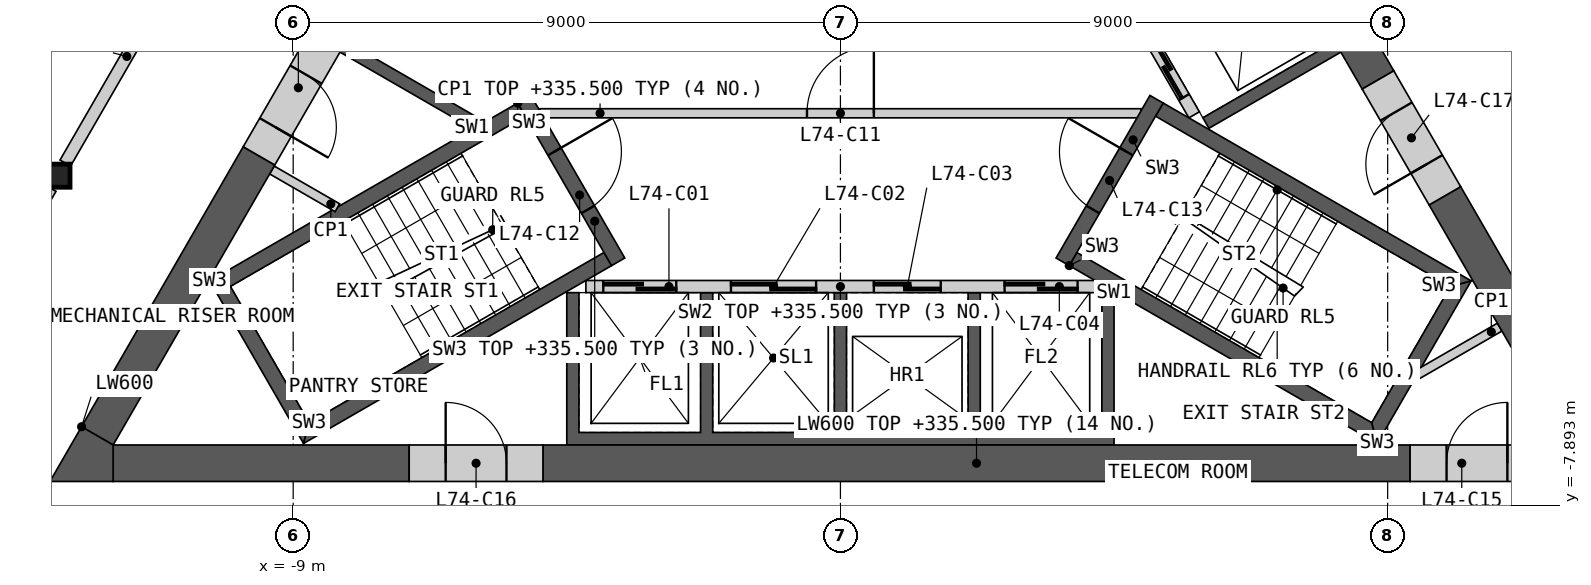
"""IFC4 building model, lengths in metres.
Left out: names, types, materials, properties, quantities, classifications, styles, units other than length and angle.
Written with IfcOpenShell. Run it as: python <this file> out.ifc"""

import sys

from ifc_helpers import new_model, si_unit, direction, frame, frame_2d, origin, origin_2d, place, context, subcontext, project, spatial, polyline, rectangle, i_section, outline, extrude, element, fill, save


model = new_model("IFC4")
c1 = context("Model", 3, precision=1e-05, world=origin(), true_north=direction((0.0, 1.0)))
c2 = subcontext(c1, "Body", "Model", "MODEL_VIEW")
j1 = project(units=[si_unit("LENGTHUNIT", "METRE"), si_unit("PLANEANGLEUNIT", "RADIAN")], contexts=[c1])
p1 = place(None, origin())
s1 = spatial("IfcSite", under=j1, at=p1, CompositionType="ELEMENT")
p2 = place(p1, origin())
s2 = spatial("IfcBuilding", under=s1, at=p2, CompositionType="ELEMENT")
p3 = place(p2, frame((0.0, 0.0, 332.4)))
s3 = spatial("IfcBuildingStorey", under=s2, at=p3, CompositionType="ELEMENT", Elevation=332.4)
p4 = place(p3, frame((-12.868, -2.476, 0.0), z_axis=(0.0, 0.0, 1.0), x_axis=(1.0, 0.0, 0.0)))
e1 = element("IfcColumn", 1, at=p4, inside=s3, PredefinedType="COLUMN", context=c2, shape_type="SweptSolid", body=[
    extrude(i_section(OverallWidth=0.396, OverallDepth=0.381, WebThickness=0.019, FlangeThickness=0.03, at=origin_2d()), origin(), (0.0, 0.0, 1.0), 3.4),
])
p5 = place(p3, origin())
e2 = element("IfcWall", 2, at=p5, inside=s3, PredefinedType="SHEAR", context=c2, shape_type="SweptSolid", body=[
    extrude(outline(polyline([(4.5, -4.4), (4.5, -6.906), (-4.5, -6.906), (-4.5, -4.4), (-4.3, -4.4), (-4.3, -6.7), (-2.3, -6.7), (-2.3, -4.4), (-2.1, -4.4), (-2.1, -6.7), (-0.1, -6.7), (-0.1, -4.4), (0.1, -4.4), (0.1, -6.7), (2.1, -6.7), (2.1, -4.4), (2.3, -4.4), (2.3, -6.7), (4.3, -6.7), (4.3, -4.4), (4.5, -4.4)])), origin(), (0.0, 0.0, 1.0), 3.1),
])
p6 = place(p3, frame((-4.187, -4.3, 0.0), z_axis=(0.0, 0.0, 1.0), x_axis=(1.0, 0.0, 0.0)))
e3 = element("IfcWall", 3, at=p6, inside=s3, PredefinedType="SOLIDWALL", context=c2, shape_type="SweptSolid", body=[
    extrude(rectangle(XDim=8.373, YDim=0.2, at=frame_2d((4.187, 0.0))), origin(), (0.0, 0.0, 1.0), 3.1),
])
p7 = place(p6, frame((0.287, 0.0, 0.0)))
e4 = element("IfcOpeningElement", 4, at=p7, cuts=e3, PredefinedType="OPENING", context=c2, shape_type="SweptSolid", body=[
    extrude(rectangle(XDim=1.2, YDim=2.1, at=frame_2d((0.6, 1.05))), frame((0.0, 0.11, 0.0), z_axis=(0.0, -1.0, 0.0), x_axis=(1.0, 0.0, 0.0)), (0.0, 0.0, 1.0), 0.22),
])
p8 = place(p6, frame((2.387, 0.0, 0.0)))
e5 = element("IfcOpeningElement", 5, at=p8, cuts=e3, PredefinedType="OPENING", context=c2, shape_type="SweptSolid", body=[
    extrude(rectangle(XDim=1.4, YDim=2.1, at=frame_2d((0.7, 1.05))), frame((0.0, 0.11, 0.0), z_axis=(0.0, -1.0, 0.0), x_axis=(1.0, 0.0, 0.0)), (0.0, 0.0, 1.0), 0.22),
])
p9 = place(p6, frame((4.737, 0.0, 0.0)))
e6 = element("IfcOpeningElement", 6, at=p9, cuts=e3, PredefinedType="OPENING", context=c2, shape_type="SweptSolid", body=[
    extrude(rectangle(XDim=1.1, YDim=2.1, at=frame_2d((0.55, 1.05))), frame((0.0, 0.11, 0.0), z_axis=(0.0, -1.0, 0.0), x_axis=(1.0, 0.0, 0.0)), (0.0, 0.0, 1.0), 0.22),
])
p10 = place(p6, frame((6.887, 0.0, 0.0)))
e7 = element("IfcOpeningElement", 7, at=p10, cuts=e3, PredefinedType="OPENING", context=c2, shape_type="SweptSolid", body=[
    extrude(rectangle(XDim=1.2, YDim=2.1, at=frame_2d((0.6, 1.05))), frame((0.0, 0.11, 0.0), z_axis=(0.0, -1.0, 0.0), x_axis=(1.0, 0.0, 0.0)), (0.0, 0.0, 1.0), 0.22),
])
p11 = place(p3, origin())
e8 = element("IfcWall", 8, at=p11, inside=s3, PredefinedType="SHEAR", context=c2, shape_type="SweptSolid", body=[
    extrude(outline(polyline([(1.561, 6.097), (3.731, 7.35), (8.231, -0.444), (6.061, -1.697), (5.96, -1.524), (7.952, -0.374), (6.952, 1.358), (4.96, 0.208), (4.861, 0.381), (6.852, 1.531), (5.852, 3.263), (3.861, 2.113), (3.76, 2.287), (5.752, 3.437), (4.752, 5.169), (2.76, 4.019), (2.66, 4.192), (4.652, 5.342), (3.652, 7.074), (1.66, 5.924), (1.561, 6.097)])), origin(), (0.0, 0.0, 1.0), 3.1),
])
p12 = place(p3, frame((5.817, -1.476, 0.0), z_axis=(0.0, 0.0, 1.0), x_axis=(-0.500002616675, 0.866023893041, 0.0)))
e9 = element("IfcWall", 9, at=p12, inside=s3, PredefinedType="SOLIDWALL", context=c2, shape_type="SweptSolid", body=[
    extrude(rectangle(XDim=8.373, YDim=0.2, at=frame_2d((4.187, 0.0))), origin(), (0.0, 0.0, 1.0), 3.1),
])
p13 = place(p12, frame((0.337, 0.0, 0.0)))
e10 = element("IfcOpeningElement", 10, at=p13, cuts=e9, PredefinedType="OPENING", context=c2, shape_type="SweptSolid", body=[
    extrude(rectangle(XDim=1.1, YDim=2.1, at=frame_2d((0.55, 1.05))), frame((0.0, 0.11, 0.0), z_axis=(0.0, -1.0, 0.0), x_axis=(1.0, 0.0, 0.0)), (0.0, 0.0, 1.0), 0.22),
])
p14 = place(p12, frame((2.537, 0.0, 0.0)))
e11 = element("IfcOpeningElement", 11, at=p14, cuts=e9, PredefinedType="OPENING", context=c2, shape_type="SweptSolid", body=[
    extrude(rectangle(XDim=1.1, YDim=2.1, at=frame_2d((0.55, 1.05))), frame((0.0, 0.11, 0.0), z_axis=(0.0, -1.0, 0.0), x_axis=(1.0, 0.0, 0.0)), (0.0, 0.0, 1.0), 0.22),
])
p15 = place(p12, frame((4.737, 0.0, 0.0)))
e12 = element("IfcOpeningElement", 12, at=p15, cuts=e9, PredefinedType="OPENING", context=c2, shape_type="SweptSolid", body=[
    extrude(rectangle(XDim=1.1, YDim=2.1, at=frame_2d((0.55, 1.05))), frame((0.0, 0.11, 0.0), z_axis=(0.0, -1.0, 0.0), x_axis=(1.0, 0.0, 0.0)), (0.0, 0.0, 1.0), 0.22),
])
p16 = place(p12, frame((7.037, 0.0, 0.0)))
e13 = element("IfcOpeningElement", 13, at=p16, cuts=e9, PredefinedType="OPENING", context=c2, shape_type="SweptSolid", body=[
    extrude(rectangle(XDim=0.9, YDim=2.1, at=frame_2d((0.45, 1.05))), frame((0.0, 0.11, 0.0), z_axis=(0.0, -1.0, 0.0), x_axis=(1.0, 0.0, 0.0)), (0.0, 0.0, 1.0), 0.22),
])
p17 = place(p3, origin())
e14 = element("IfcWall", 14, at=p17, inside=s3, PredefinedType="SHEAR", context=c2, shape_type="SweptSolid", body=[
    extrude(outline(polyline([(-6.061, -1.697), (-8.231, -0.444), (-8.131, -0.271), (-5.96, -1.524), (-6.061, -1.697)])), origin(), (0.0, 0.0, 1.0), 3.1),
])
p18 = place(p3, frame((-4.941, -1.45, 0.0), z_axis=(0.0, 0.0, 1.0), x_axis=(1.0, 0.0, 0.0)))
e15 = element("IfcWall", 15, at=p18, inside=s3, PredefinedType="PARTITIONING", context=c2, shape_type="SweptSolid", body=[
    extrude(rectangle(XDim=9.882, YDim=0.15, at=frame_2d((4.941, 0.0))), origin(), (0.0, 0.0, 1.0), 3.1),
])
p19 = place(p18, frame((4.391, 0.0, 0.0)))
e16 = element("IfcOpeningElement", 16, at=p19, cuts=e15, PredefinedType="OPENING", context=c2, shape_type="SweptSolid", body=[
    extrude(rectangle(XDim=1.1, YDim=2.1, at=frame_2d((0.55, 1.05))), frame((0.0, 0.085, 0.0), z_axis=(0.0, -1.0, 0.0), x_axis=(1.0, 0.0, 0.0)), (0.0, 0.0, 1.0), 0.17),
])
p20 = place(p3, origin())
e17 = element("IfcWall", 17, at=p20, inside=s3, PredefinedType="SHEAR", context=c2, shape_type="SweptSolid", body=[
    extrude(outline(polyline([(-5.307, -1.281), (-10.374, -4.206), (-10.032, -4.298), (-5.182, -1.498), (-5.307, -1.281)])), origin(), (0.0, 0.0, 1.0), 3.1),
])
p21 = place(p3, origin())
e18 = element("IfcWall", 18, at=p21, inside=s3, PredefinedType="SHEAR", context=c2, shape_type="SweptSolid", body=[
    extrude(outline(polyline([(-10.374, -4.206), (-8.83, -6.881), (-8.738, -6.539), (-10.032, -4.298), (-10.374, -4.206)])), origin(), (0.0, 0.0, 1.0), 3.1),
])
p22 = place(p3, origin())
e19 = element("IfcWall", 19, at=p22, inside=s3, PredefinedType="SHEAR", context=c2, shape_type="SweptSolid", body=[
    extrude(outline(polyline([(-8.738, -6.539), (-8.83, -6.881), (-3.763, -3.956), (-3.888, -3.739), (-8.738, -6.539)])), origin(), (0.0, 0.0, 1.0), 3.1),
])
p23 = place(p3, frame((-5.199, -1.219, 0.0), z_axis=(0.0, 0.0, 1.0), x_axis=(0.499982516597, -0.866035497597, 0.0)))
e20 = element("IfcWall", 20, at=p23, inside=s3, PredefinedType="SHEAR", context=c2, shape_type="SweptSolid", body=[
    extrude(rectangle(XDim=3.088, YDim=0.25, at=frame_2d((1.544, 0.0))), origin(), (0.0, 0.0, 1.0), 3.1),
])
p24 = place(p23, frame((0.994, 0.0, 0.0)))
e21 = element("IfcOpeningElement", 21, at=p24, cuts=e20, PredefinedType="OPENING", context=c2, shape_type="SweptSolid", body=[
    extrude(rectangle(XDim=1.1, YDim=2.1, at=frame_2d((0.55, 1.05))), frame((0.0, 0.135, 0.0), z_axis=(0.0, -1.0, 0.0), x_axis=(1.0, 0.0, 0.0)), (0.0, 0.0, 1.0), 0.27),
])
p25 = place(p3, origin())
e22 = element("IfcWall", 22, at=p25, inside=s3, PredefinedType="SHEAR", context=c2, shape_type="SweptSolid", body=[
    extrude(outline(polyline([(3.763, -3.956), (8.83, -6.881), (8.738, -6.539), (3.888, -3.739), (3.763, -3.956)])), origin(), (0.0, 0.0, 1.0), 3.1),
])
p26 = place(p3, origin())
e23 = element("IfcWall", 23, at=p26, inside=s3, PredefinedType="SHEAR", context=c2, shape_type="SweptSolid", body=[
    extrude(outline(polyline([(8.83, -6.881), (10.374, -4.206), (10.032, -4.298), (8.738, -6.539), (8.83, -6.881)])), origin(), (0.0, 0.0, 1.0), 3.1),
])
p27 = place(p3, origin())
e24 = element("IfcWall", 24, at=p27, inside=s3, PredefinedType="SHEAR", context=c2, shape_type="SweptSolid", body=[
    extrude(outline(polyline([(10.032, -4.298), (10.374, -4.206), (5.307, -1.281), (5.182, -1.498), (10.032, -4.298)])), origin(), (0.0, 0.0, 1.0), 3.1),
])
p28 = place(p3, frame((3.655, -3.893, 0.0), z_axis=(0.0, 0.0, 1.0), x_axis=(0.499982516597, 0.866035497597, 0.0)))
e25 = element("IfcWall", 25, at=p28, inside=s3, PredefinedType="SHEAR", context=c2, shape_type="SweptSolid", body=[
    extrude(rectangle(XDim=3.088, YDim=0.25, at=frame_2d((1.544, 0.0))), origin(), (0.0, 0.0, 1.0), 3.1),
])
p29 = place(p28, frame((0.994, 0.0, 0.0)))
e26 = element("IfcOpeningElement", 26, at=p29, cuts=e25, PredefinedType="OPENING", context=c2, shape_type="SweptSolid", body=[
    extrude(rectangle(XDim=1.1, YDim=2.1, at=frame_2d((0.55, 1.05))), frame((0.0, 0.135, 0.0), z_axis=(0.0, -1.0, 0.0), x_axis=(1.0, 0.0, 0.0)), (0.0, 0.0, 1.0), 0.27),
])
p30 = place(p3, frame((-9.35, -2.383, 0.0), z_axis=(0.0, 0.0, 1.0), x_axis=(0.866057962423, -0.499943602543, 0.0)))
e27 = element("IfcWall", 27, at=p30, inside=s3, PredefinedType="PARTITIONING", context=c2, shape_type="SweptSolid", body=[
    extrude(rectangle(XDim=1.242, YDim=0.15, at=frame_2d((0.621, 0.0))), origin(), (0.0, 0.0, 1.0), 3.1),
])
p31 = place(p3, frame((10.842, -4.967, 0.0), z_axis=(0.0, 0.0, 1.0), x_axis=(-0.866098216386, -0.499873863663, 0.0)))
e28 = element("IfcWall", 28, at=p31, inside=s3, PredefinedType="PARTITIONING", context=c2, shape_type="SweptSolid", body=[
    extrude(rectangle(XDim=1.582, YDim=0.15, at=frame_2d((0.791, 0.0))), origin(), (0.0, 0.0, 1.0), 3.1),
])
p32 = place(p3, frame((-4.892, -7.206, 0.0), z_axis=(0.0, 0.0, 1.0), x_axis=(1.0, 0.0, 0.0)))
e29 = element("IfcWall", 29, at=p32, inside=s3, PredefinedType="SHEAR", context=c2, shape_type="SweptSolid", body=[
    extrude(rectangle(XDim=14.261, YDim=0.6, at=frame_2d((7.13, 0.0))), origin(), (0.0, 0.0, 1.0), 3.1),
])
p33 = place(p3, frame((-11.961, -7.206, 0.0), z_axis=(0.0, 0.0, 1.0), x_axis=(1.0, 0.0, 0.0)))
e30 = element("IfcWall", 30, at=p33, inside=s3, PredefinedType="SHEAR", context=c2, shape_type="SweptSolid", body=[
    extrude(rectangle(XDim=4.868, YDim=0.6, at=frame_2d((2.434, 0.0))), origin(), (0.0, 0.0, 1.0), 3.1),
])
p34 = place(p3, frame((8.841, -0.902, 0.0), z_axis=(0.0, 0.0, 1.0), x_axis=(-0.499995618375, 0.866027933502, 0.0)))
e31 = element("IfcWall", 31, at=p34, inside=s3, PredefinedType="SHEAR", context=c2, shape_type="SweptSolid", body=[
    extrude(rectangle(XDim=14.571, YDim=0.6, at=frame_2d((7.285, 0.0))), origin(), (0.0, 0.0, 1.0), 3.1),
])
p35 = place(p3, frame((12.221, -6.756, 0.0), z_axis=(0.0, 0.0, 1.0), x_axis=(-0.500020646047, 0.866013483456, 0.0)))
e32 = element("IfcWall", 32, at=p35, inside=s3, PredefinedType="SHEAR", context=c2, shape_type="SweptSolid", body=[
    extrude(rectangle(XDim=4.559, YDim=0.6, at=frame_2d((2.28, 0.0))), origin(), (0.0, 0.0, 1.0), 3.1),
])
p36 = place(p3, frame((-9.562, -2.15, 0.0), z_axis=(0.0, 0.0, 1.0), x_axis=(-0.500015214976, -0.866016619236, 0.0)))
e33 = element("IfcWall", 33, at=p36, inside=s3, PredefinedType="SHEAR", context=c2, shape_type="SweptSolid", body=[
    extrude(rectangle(XDim=5.318, YDim=0.6, at=frame_2d((2.659, 0.0))), origin(), (0.0, 0.0, 1.0), 3.1),
])
p37 = place(p3, origin())
e34 = element("IfcWall", 34, at=p37, inside=s3, PredefinedType="SHEAR", context=c2, shape_type="SweptSolid", body=[
    extrude(outline(polyline([(-12.48, -6.606), (-11.961, -6.906), (-11.961, -7.506), (-13.0, -7.506), (-12.48, -6.606)])), origin(), (0.0, 0.0, 1.0), 3.1),
])
p38 = place(p3, frame((9.369, -7.206, 0.0), z_axis=(0.0, 0.0, 1.0), x_axis=(1.0, 0.0, 0.0)))
e35 = element("IfcWall", 35, at=p38, inside=s3, PredefinedType="SHEAR", context=c2, shape_type="SweptSolid", body=[
    extrude(rectangle(XDim=2.592, YDim=0.6, at=frame_2d((1.296, 0.0))), origin(), (0.0, 0.0, 1.0), 3.1),
])
p39 = place(p38, frame((0.6, 0.0, 0.0)))
e36 = element("IfcOpeningElement", 36, at=p39, cuts=e35, PredefinedType="OPENING", context=c2, shape_type="SweptSolid", body=[
    extrude(rectangle(XDim=1.0, YDim=2.1, at=frame_2d((0.5, 1.05))), frame((0.0, 0.31, 0.0), z_axis=(0.0, -1.0, 0.0), x_axis=(1.0, 0.0, 0.0)), (0.0, 0.0, 1.0), 0.62),
])
p40 = place(p3, frame((-7.092, -7.206, 0.0), z_axis=(0.0, 0.0, 1.0), x_axis=(1.0, 0.0, 0.0)))
e37 = element("IfcWall", 37, at=p40, inside=s3, PredefinedType="SHEAR", context=c2, shape_type="SweptSolid", body=[
    extrude(rectangle(XDim=2.2, YDim=0.6, at=frame_2d((1.1, 0.0))), origin(), (0.0, 0.0, 1.0), 3.1),
])
p41 = place(p40, frame((0.6, 0.0, 0.0)))
e38 = element("IfcOpeningElement", 38, at=p41, cuts=e37, PredefinedType="OPENING", context=c2, shape_type="SweptSolid", body=[
    extrude(rectangle(XDim=1.0, YDim=2.1, at=frame_2d((0.5, 1.05))), frame((0.0, 0.31, 0.0), z_axis=(0.0, -1.0, 0.0), x_axis=(1.0, 0.0, 0.0)), (0.0, 0.0, 1.0), 0.62),
])
p42 = place(p3, frame((9.941, -2.807, 0.0), z_axis=(0.0, 0.0, 1.0), x_axis=(-0.499994660107, 0.866028486751, 0.0)))
e39 = element("IfcWall", 39, at=p42, inside=s3, PredefinedType="SHEAR", context=c2, shape_type="SweptSolid", body=[
    extrude(rectangle(XDim=2.2, YDim=0.6, at=frame_2d((1.1, 0.0))), origin(), (0.0, 0.0, 1.0), 3.1),
])
p43 = place(p42, frame((0.6, 0.0, 0.0)))
e40 = element("IfcOpeningElement", 40, at=p43, cuts=e39, PredefinedType="OPENING", context=c2, shape_type="SweptSolid", body=[
    extrude(rectangle(XDim=1.0, YDim=2.1, at=frame_2d((0.5, 1.05))), frame((0.0, 0.31, 0.0), z_axis=(0.0, -1.0, 0.0), x_axis=(1.0, 0.0, 0.0)), (0.0, 0.0, 1.0), 0.62),
])
p44 = place(p3, frame((-8.44, -0.208, 0.0), z_axis=(0.0, 0.0, 1.0), x_axis=(-0.500001951578, -0.866024277037, 0.0)))
e41 = element("IfcWall", 41, at=p44, inside=s3, PredefinedType="SHEAR", context=c2, shape_type="SweptSolid", body=[
    extrude(rectangle(XDim=2.243, YDim=0.6, at=frame_2d((1.122, 0.0))), origin(), (0.0, 0.0, 1.0), 3.1),
])
p45 = place(p44, frame((0.7, 0.0, 0.0)))
e42 = element("IfcOpeningElement", 42, at=p45, cuts=e41, PredefinedType="OPENING", context=c2, shape_type="SweptSolid", body=[
    extrude(rectangle(XDim=1.0, YDim=2.1, at=frame_2d((0.5, 1.05))), frame((0.0, 0.31, 0.0), z_axis=(0.0, -1.0, 0.0), x_axis=(1.0, 0.0, 0.0)), (0.0, 0.0, 1.0), 0.62),
])
p46 = place(p3, frame((8.698, 4.745, 0.0), z_axis=(0.0, 0.0, 1.0), x_axis=(0.499984266882, -0.866034487114, 0.0)))
e43 = element("IfcWall", 43, at=p46, inside=s3, PredefinedType="PARTITIONING", context=c2, shape_type="SweptSolid", body=[
    extrude(rectangle(XDim=8.099, YDim=0.2, at=frame_2d((4.049, 0.0))), origin(), (0.0, 0.0, 1.0), 3.1),
])
p47 = place(p46, frame((1.164, 0.0, 0.0)))
e44 = element("IfcOpeningElement", 44, at=p47, cuts=e43, PredefinedType="OPENING", context=c2, shape_type="SweptSolid", body=[
    extrude(rectangle(XDim=1.0, YDim=2.1, at=frame_2d((0.5, 1.05))), frame((0.0, 0.11, 0.0), z_axis=(0.0, -1.0, 0.0), x_axis=(1.0, 0.0, 0.0)), (0.0, 0.0, 1.0), 0.22),
])
p48 = place(p3, frame((-12.748, -2.269, 0.0), z_axis=(0.0, 0.0, 1.0), x_axis=(0.499984266882, 0.866034487114, 0.0)))
e45 = element("IfcWall", 45, at=p48, inside=s3, PredefinedType="PARTITIONING", context=c2, shape_type="SweptSolid", body=[
    extrude(rectangle(XDim=8.099, YDim=0.2, at=frame_2d((4.049, 0.0))), origin(), (0.0, 0.0, 1.0), 3.1),
])
p49 = place(p48, frame((3.702, 0.0, 0.0)))
e46 = element("IfcOpeningElement", 46, at=p49, cuts=e45, PredefinedType="OPENING", context=c2, shape_type="SweptSolid", body=[
    extrude(rectangle(XDim=1.0, YDim=2.1, at=frame_2d((0.5, 1.05))), frame((0.0, 0.11, 0.0), z_axis=(0.0, -1.0, 0.0), x_axis=(1.0, 0.0, 0.0)), (0.0, 0.0, 1.0), 0.22),
])
p50 = place(p3, frame((-15.131, -6.397, 0.0), z_axis=(0.0, 0.0, 1.0), x_axis=(0.500003406062, 0.866023437285, 0.0)))
e47 = element("IfcWall", 47, at=p50, inside=s3, PredefinedType="PARTITIONING", context=c2, shape_type="SweptSolid", body=[
    extrude(rectangle(XDim=4.288, YDim=0.2, at=frame_2d((2.144, 0.0))), origin(), (0.0, 0.0, 1.0), 3.1),
])
p51 = place(p50, frame((0.766, 0.0, 0.0)))
e48 = element("IfcOpeningElement", 48, at=p51, cuts=e47, PredefinedType="OPENING", context=c2, shape_type="SweptSolid", body=[
    extrude(rectangle(XDim=1.0, YDim=2.1, at=frame_2d((0.5, 1.05))), frame((0.0, 0.11, 0.0), z_axis=(0.0, -1.0, 0.0), x_axis=(1.0, 0.0, 0.0)), (0.0, 0.0, 1.0), 0.22),
])
p52 = place(p7, origin())
e49 = element("IfcDoor", 49, at=p52, inside=s3, OperationType="SLIDING_TO_LEFT", PredefinedType="DOOR", context=c2, shape_type="SweptSolid", body=[
    extrude(rectangle(XDim=1.2, YDim=2.1, at=frame_2d((0.6, 1.05))), frame((0.0, 0.025, 0.0), z_axis=(0.0, -1.0, 0.0), x_axis=(1.0, 0.0, 0.0)), (0.0, 0.0, 1.0), 0.05),
])
fill(e4, e49)
p53 = place(p8, origin())
e50 = element("IfcDoor", 50, at=p53, inside=s3, OperationType="SLIDING_TO_LEFT", PredefinedType="DOOR", context=c2, shape_type="SweptSolid", body=[
    extrude(rectangle(XDim=1.4, YDim=2.1, at=frame_2d((0.7, 1.05))), frame((0.0, 0.025, 0.0), z_axis=(0.0, -1.0, 0.0), x_axis=(1.0, 0.0, 0.0)), (0.0, 0.0, 1.0), 0.05),
])
fill(e5, e50)
p54 = place(p9, origin())
e51 = element("IfcDoor", 51, at=p54, inside=s3, OperationType="SLIDING_TO_LEFT", PredefinedType="DOOR", context=c2, shape_type="SweptSolid", body=[
    extrude(rectangle(XDim=1.1, YDim=2.1, at=frame_2d((0.55, 1.05))), frame((0.0, 0.025, 0.0), z_axis=(0.0, -1.0, 0.0), x_axis=(1.0, 0.0, 0.0)), (0.0, 0.0, 1.0), 0.05),
])
fill(e6, e51)
p55 = place(p10, origin())
e52 = element("IfcDoor", 52, at=p55, inside=s3, OperationType="SLIDING_TO_LEFT", PredefinedType="DOOR", context=c2, shape_type="SweptSolid", body=[
    extrude(rectangle(XDim=1.2, YDim=2.1, at=frame_2d((0.6, 1.05))), frame((0.0, 0.025, 0.0), z_axis=(0.0, -1.0, 0.0), x_axis=(1.0, 0.0, 0.0)), (0.0, 0.0, 1.0), 0.05),
])
fill(e7, e52)
p56 = place(p13, origin())
e53 = element("IfcDoor", 53, at=p56, inside=s3, OperationType="SLIDING_TO_LEFT", PredefinedType="DOOR", context=c2, shape_type="SweptSolid", body=[
    extrude(rectangle(XDim=1.1, YDim=2.1, at=frame_2d((0.55, 1.05))), frame((0.0, 0.025, 0.0), z_axis=(0.0, -1.0, 0.0), x_axis=(1.0, 0.0, 0.0)), (0.0, 0.0, 1.0), 0.05),
])
fill(e10, e53)
p57 = place(p19, origin())
e54 = element("IfcDoor", 54, at=p57, inside=s3, OperationType="SINGLE_SWING_RIGHT", PredefinedType="DOOR", context=c2, shape_type="SweptSolid", body=[
    extrude(rectangle(XDim=1.1, YDim=2.1, at=frame_2d((0.55, 1.05))), frame((0.0, 0.025, 0.0), z_axis=(0.0, -1.0, 0.0), x_axis=(1.0, 0.0, 0.0)), (0.0, 0.0, 1.0), 0.05),
])
fill(e16, e54)
p58 = place(p24, origin())
e55 = element("IfcDoor", 55, at=p58, inside=s3, OperationType="SINGLE_SWING_LEFT", PredefinedType="DOOR", context=c2, shape_type="SweptSolid", body=[
    extrude(rectangle(XDim=1.1, YDim=2.1, at=frame_2d((0.55, 1.05))), frame((0.0, 0.025, 0.0), z_axis=(0.0, -1.0, 0.0), x_axis=(1.0, 0.0, 0.0)), (0.0, 0.0, 1.0), 0.05),
])
fill(e21, e55)
p59 = place(p29, origin())
e56 = element("IfcDoor", 56, at=p59, inside=s3, OperationType="SINGLE_SWING_RIGHT", PredefinedType="DOOR", context=c2, shape_type="SweptSolid", body=[
    extrude(rectangle(XDim=1.1, YDim=2.1, at=frame_2d((0.55, 1.05))), frame((0.0, 0.025, 0.0), z_axis=(0.0, -1.0, 0.0), x_axis=(1.0, 0.0, 0.0)), (0.0, 0.0, 1.0), 0.05),
])
fill(e26, e56)
p60 = place(p39, origin())
e57 = element("IfcDoor", 57, at=p60, inside=s3, OperationType="SINGLE_SWING_RIGHT", PredefinedType="DOOR", context=c2, shape_type="SweptSolid", body=[
    extrude(rectangle(XDim=1.0, YDim=2.1, at=frame_2d((0.5, 1.05))), frame((0.0, 0.055, 0.0), z_axis=(0.0, -1.0, 0.0), x_axis=(1.0, 0.0, 0.0)), (0.0, 0.0, 1.0), 0.05),
])
fill(e36, e57)
p61 = place(p41, origin())
e58 = element("IfcDoor", 58, at=p61, inside=s3, OperationType="SINGLE_SWING_LEFT", PredefinedType="DOOR", context=c2, shape_type="SweptSolid", body=[
    extrude(rectangle(XDim=1.0, YDim=2.1, at=frame_2d((0.5, 1.05))), frame((0.0, 0.055, 0.0), z_axis=(0.0, -1.0, 0.0), x_axis=(1.0, 0.0, 0.0)), (0.0, 0.0, 1.0), 0.05),
])
fill(e38, e58)
p62 = place(p43, origin())
e59 = element("IfcDoor", 59, at=p62, inside=s3, OperationType="SINGLE_SWING_LEFT", PredefinedType="DOOR", context=c2, shape_type="SweptSolid", body=[
    extrude(rectangle(XDim=1.0, YDim=2.1, at=frame_2d((0.5, 1.05))), frame((0.0, 0.055, 0.0), z_axis=(0.0, -1.0, 0.0), x_axis=(1.0, 0.0, 0.0)), (0.0, 0.0, 1.0), 0.05),
])
fill(e40, e59)
p63 = place(p45, origin())
e60 = element("IfcDoor", 60, at=p63, inside=s3, OperationType="SINGLE_SWING_RIGHT", PredefinedType="DOOR", context=c2, shape_type="SweptSolid", body=[
    extrude(rectangle(XDim=1.0, YDim=2.1, at=frame_2d((0.5, 1.05))), frame((0.0, 0.055, 0.0), z_axis=(0.0, -1.0, 0.0), x_axis=(1.0, 0.0, 0.0)), (0.0, 0.0, 1.0), 0.05),
])
fill(e42, e60)
save(model, sys.argv[1])
